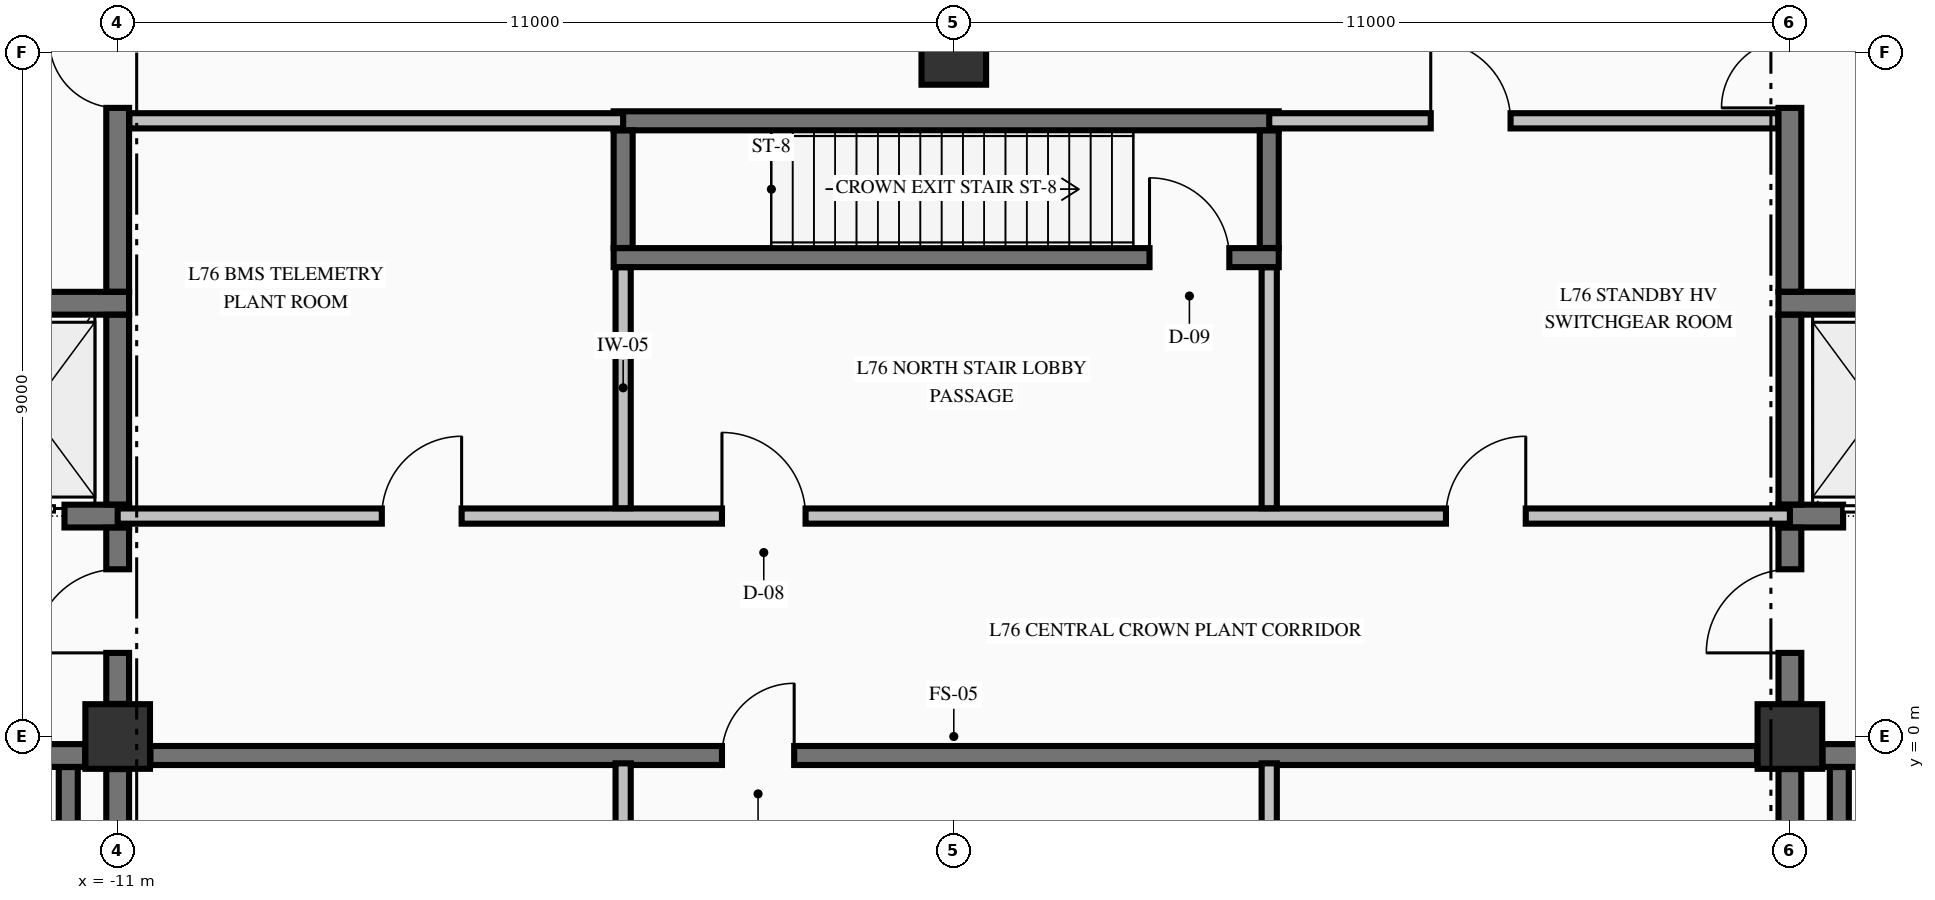
"""IFC4 building model, lengths in metres.
Left out: names, types, materials, properties, quantities, classifications, styles, units other than length and angle.
Written with IfcOpenShell. Run it as: python <this file> out.ifc"""

import sys

from ifc_helpers import new_model, si_unit, direction, frame, frame_2d, origin, origin_2d, place, context, subcontext, project, spatial, rectangle, extrude, element, fill, save


model = new_model("IFC4")
c1 = context("Model", 3, precision=1e-05, world=origin(), true_north=direction((0.0, 1.0)))
c2 = subcontext(c1, "Body", "Model", "MODEL_VIEW")
j1 = project(units=[si_unit("LENGTHUNIT", "METRE"), si_unit("PLANEANGLEUNIT", "RADIAN")], contexts=[c1])
p1 = place(None, origin())
s1 = spatial("IfcSite", under=j1, at=p1, CompositionType="ELEMENT")
p2 = place(p1, origin())
s2 = spatial("IfcBuilding", under=s1, at=p2, CompositionType="ELEMENT")
p3 = place(p2, frame((0.0, 0.0, 284.86)))
s3 = spatial("IfcBuildingStorey", under=s2, at=p3, CompositionType="ELEMENT", Elevation=284.86)
for number, where, z_axis, x_axis in (
    (1, (-11.0, 0.0, -0.325), (0.0, 0.0, 1.0), (1.0, 0.0, 0.0)),
    (2, (11.0, 0.0, -0.325), (0.0, 0.0, 1.0), (1.0, 0.0, 0.0)),
    (3, (0.0, 9.0, -0.325), (0.0, 0.0, 1.0), (1.0, 0.0, 0.0)),
):
    element("IfcColumn", number, at=place(p3, frame(where, z_axis=z_axis, x_axis=x_axis)), inside=s3, PredefinedType="COLUMN", context=c2, shape_type="SweptSolid", body=[
        extrude(rectangle(XDim=0.85, YDim=0.85, at=origin_2d()), origin(), (0.0, 0.0, 1.0), 3.06),
    ])
p4 = place(p3, frame((-14.85, -0.25, 0.0), z_axis=(0.0, 0.0, 1.0), x_axis=(1.0, 0.0, 0.0)))
e4 = element("IfcWall", 4, at=p4, inside=s3, PredefinedType="SHEAR", context=c2, shape_type="SweptSolid", body=[
    extrude(rectangle(XDim=3.421, YDim=0.3, at=frame_2d((1.71, 0.0))), origin(), (0.0, 0.0, 1.0), 2.735),
])
p5 = place(p4, frame((1.15, 0.0, 0.0)))
e5 = element("IfcOpeningElement", 5, at=p5, cuts=e4, PredefinedType="OPENING", context=c2, shape_type="SweptSolid", body=[
    extrude(rectangle(XDim=1.1, YDim=2.15, at=frame_2d((0.55, 1.075))), frame((0.0, 0.16, 0.0), z_axis=(0.0, -1.0, 0.0), x_axis=(1.0, 0.0, 0.0)), (0.0, 0.0, 1.0), 0.32),
])
p6 = place(p3, frame((11.429, -0.25, 0.0), z_axis=(0.0, 0.0, 1.0), x_axis=(1.0, 0.0, 0.0)))
e6 = element("IfcWall", 6, at=p6, inside=s3, PredefinedType="SHEAR", context=c2, shape_type="SweptSolid", body=[
    extrude(rectangle(XDim=3.421, YDim=0.3, at=frame_2d((1.71, 0.0))), origin(), (0.0, 0.0, 1.0), 2.735),
])
p7 = place(p6, frame((1.171, 0.0, 0.0)))
e7 = element("IfcOpeningElement", 7, at=p7, cuts=e6, PredefinedType="OPENING", context=c2, shape_type="SweptSolid", body=[
    extrude(rectangle(XDim=1.1, YDim=2.15, at=frame_2d((0.55, 1.075))), frame((0.0, 0.16, 0.0), z_axis=(0.0, -1.0, 0.0), x_axis=(1.0, 0.0, 0.0)), (0.0, 0.0, 1.0), 0.32),
])
p8 = place(p3, frame((-14.85, 2.9, 0.0), z_axis=(0.0, 0.0, 1.0), x_axis=(1.0, 0.0, 0.0)))
e8 = element("IfcWall", 8, at=p8, inside=s3, PredefinedType="SHEAR", context=c2, shape_type="SweptSolid", body=[
    extrude(rectangle(XDim=4.0, YDim=0.3, at=frame_2d((2.0, 0.0))), origin(), (0.0, 0.0, 1.0), 2.735),
])
p9 = place(p8, frame((2.05, 0.0, 0.0)))
e9 = element("IfcOpeningElement", 9, at=p9, cuts=e8, PredefinedType="OPENING", context=c2, shape_type="SweptSolid", body=[
    extrude(rectangle(XDim=1.1, YDim=2.2, at=frame_2d((0.55, 1.1))), frame((0.0, 0.16, 0.0), z_axis=(0.0, -1.0, 0.0), x_axis=(1.0, 0.0, 0.0)), (0.0, 0.0, 1.0), 0.32),
])
p10 = place(p3, frame((10.85, 2.9, 0.0), z_axis=(0.0, 0.0, 1.0), x_axis=(1.0, 0.0, 0.0)))
e10 = element("IfcWall", 10, at=p10, inside=s3, PredefinedType="SHEAR", context=c2, shape_type="SweptSolid", body=[
    extrude(rectangle(XDim=4.0, YDim=0.3, at=frame_2d((2.0, 0.0))), origin(), (0.0, 0.0, 1.0), 2.735),
])
p11 = place(p10, frame((0.85, 0.0, 0.0)))
e11 = element("IfcOpeningElement", 11, at=p11, cuts=e10, PredefinedType="OPENING", context=c2, shape_type="SweptSolid", body=[
    extrude(rectangle(XDim=1.1, YDim=2.2, at=frame_2d((0.55, 1.1))), frame((0.0, 0.16, 0.0), z_axis=(0.0, -1.0, 0.0), x_axis=(1.0, 0.0, 0.0)), (0.0, 0.0, 1.0), 0.32),
])
for number, where, z_axis, x_axis in (
    (12, (-14.85, 5.7, 0.0), (0.0, 0.0, 1.0), (1.0, 0.0, 0.0)),
    (13, (10.85, 5.7, 0.0), (0.0, 0.0, 1.0), (1.0, 0.0, 0.0)),
):
    element("IfcWall", number, at=place(p3, frame(where, z_axis=z_axis, x_axis=x_axis)), inside=s3, PredefinedType="SHEAR", context=c2, shape_type="SweptSolid", body=[
        extrude(rectangle(XDim=4.0, YDim=0.3, at=frame_2d((2.0, 0.0))), origin(), (0.0, 0.0, 1.0), 2.735),
    ])
p12 = place(p3, frame((-4.475, 6.3, 0.0), z_axis=(0.0, 0.0, 1.0), x_axis=(1.0, 0.0, 0.0)))
e14 = element("IfcWall", 14, at=p12, inside=s3, PredefinedType="SOLIDWALL", context=c2, shape_type="SweptSolid", body=[
    extrude(rectangle(XDim=8.75, YDim=0.25, at=frame_2d((4.375, 0.0))), origin(), (0.0, 0.0, 1.0), 2.735),
])
p13 = place(p12, frame((7.05, 0.0, 0.0)))
e15 = element("IfcOpeningElement", 15, at=p13, cuts=e14, PredefinedType="OPENING", context=c2, shape_type="SweptSolid", body=[
    extrude(rectangle(XDim=1.05, YDim=2.15, at=frame_2d((0.525, 1.075))), frame((0.0, 0.135, 0.0), z_axis=(0.0, -1.0, 0.0), x_axis=(1.0, 0.0, 0.0)), (0.0, 0.0, 1.0), 0.27),
])
p14 = place(p3, frame((-4.475, 8.1, 0.0), z_axis=(0.0, 0.0, 1.0), x_axis=(1.0, 0.0, 0.0)))
e16 = element("IfcWall", 16, at=p14, inside=s3, PredefinedType="SOLIDWALL", context=c2, shape_type="SweptSolid", body=[
    extrude(rectangle(XDim=8.75, YDim=0.25, at=frame_2d((4.375, 0.0))), origin(), (0.0, 0.0, 1.0), 2.735),
])
p15 = place(p3, frame((-10.569, -0.25, 0.0), z_axis=(0.0, 0.0, 1.0), x_axis=(1.0, 0.0, 0.0)))
e17 = element("IfcWall", 17, at=p15, inside=s3, PredefinedType="SOLIDWALL", context=c2, shape_type="SweptSolid", body=[
    extrude(rectangle(XDim=21.138, YDim=0.25, at=frame_2d((10.569, 0.0))), origin(), (0.0, 0.0, 1.0), 2.735),
])
p16 = place(p15, frame((7.519, 0.0, 0.0)))
e18 = element("IfcOpeningElement", 18, at=p16, cuts=e17, PredefinedType="OPENING", context=c2, shape_type="SweptSolid", body=[
    extrude(rectangle(XDim=0.95, YDim=2.02, at=frame_2d((0.475, 1.01))), frame((0.0, 0.135, 0.0), z_axis=(0.0, -1.0, 0.0), x_axis=(1.0, 0.0, 0.0)), (0.0, 0.0, 1.0), 0.27),
])
p17 = place(p3, frame((-11.0, 2.9, 0.0), z_axis=(0.0, 0.0, 1.0), x_axis=(1.0, 0.0, 0.0)))
e19 = element("IfcWall", 19, at=p17, inside=s3, PredefinedType="PARTITIONING", context=c2, shape_type="SweptSolid", body=[
    extrude(rectangle(XDim=22.0, YDim=0.2, at=frame_2d((11.0, 0.0))), origin(), (0.0, 0.0, 1.0), 2.735),
])
p18 = place(p17, frame((7.95, 0.0, 0.0)))
e20 = element("IfcOpeningElement", 20, at=p18, cuts=e19, PredefinedType="OPENING", context=c2, shape_type="SweptSolid", body=[
    extrude(rectangle(XDim=1.1, YDim=2.15, at=frame_2d((0.55, 1.075))), frame((0.0, 0.11, 0.0), z_axis=(0.0, -1.0, 0.0), x_axis=(1.0, 0.0, 0.0)), (0.0, 0.0, 1.0), 0.22),
])
p19 = place(p17, frame((17.475, 0.0, 0.0)))
e21 = element("IfcOpeningElement", 21, at=p19, cuts=e19, PredefinedType="OPENING", context=c2, shape_type="SweptSolid", body=[
    extrude(rectangle(XDim=1.05, YDim=2.15, at=frame_2d((0.525, 1.075))), frame((0.0, 0.11, 0.0), z_axis=(0.0, -1.0, 0.0), x_axis=(1.0, 0.0, 0.0)), (0.0, 0.0, 1.0), 0.22),
])
p20 = place(p17, frame((3.475, 0.0, 0.0)))
e22 = element("IfcOpeningElement", 22, at=p20, cuts=e19, PredefinedType="OPENING", context=c2, shape_type="SweptSolid", body=[
    extrude(rectangle(XDim=1.05, YDim=2.15, at=frame_2d((0.525, 1.075))), frame((0.0, 0.11, 0.0), z_axis=(0.0, -1.0, 0.0), x_axis=(1.0, 0.0, 0.0)), (0.0, 0.0, 1.0), 0.22),
])
p21 = place(p3, frame((-10.847, 8.1, 0.0), z_axis=(0.0, 0.0, 1.0), x_axis=(1.0, 0.0, 0.0)))
e23 = element("IfcWall", 23, at=p21, inside=s3, PredefinedType="PARTITIONING", context=c2, shape_type="SweptSolid", body=[
    extrude(rectangle(XDim=6.497, YDim=0.2, at=frame_2d((3.249, 0.0))), origin(), (0.0, 0.0, 1.0), 2.735),
])
p22 = place(p3, frame((4.15, 8.1, 0.0), z_axis=(0.0, 0.0, 1.0), x_axis=(1.0, 0.0, 0.0)))
e24 = element("IfcWall", 24, at=p22, inside=s3, PredefinedType="PARTITIONING", context=c2, shape_type="SweptSolid", body=[
    extrude(rectangle(XDim=6.697, YDim=0.2, at=frame_2d((3.349, 0.0))), origin(), (0.0, 0.0, 1.0), 2.735),
])
p23 = place(p22, frame((2.125, 0.0, 0.0)))
e25 = element("IfcOpeningElement", 25, at=p23, cuts=e24, PredefinedType="OPENING", context=c2, shape_type="SweptSolid", body=[
    extrude(rectangle(XDim=1.05, YDim=2.15, at=frame_2d((0.525, 1.075))), frame((0.0, 0.11, 0.0), z_axis=(0.0, -1.0, 0.0), x_axis=(1.0, 0.0, 0.0)), (0.0, 0.0, 1.0), 0.22),
])
p24 = place(p3, frame((-11.65, -9.798, 0.0), z_axis=(0.0, 0.0, 1.0), x_axis=(0.0, 1.0, 0.0)))
e26 = element("IfcWall", 26, at=p24, inside=s3, PredefinedType="SOLIDWALL", context=c2, shape_type="SweptSolid", body=[
    extrude(rectangle(XDim=9.396, YDim=0.25, at=frame_2d((4.698, 0.0))), origin(), (0.0, 0.0, 1.0), 2.735),
])
p25 = place(p3, frame((-11.0, -9.798, 0.0), z_axis=(0.0, 0.0, 1.0), x_axis=(0.0, 1.0, 0.0)))
e27 = element("IfcWall", 27, at=p25, inside=s3, PredefinedType="SHEAR", context=c2, shape_type="SweptSolid", body=[
    extrude(rectangle(XDim=9.369, YDim=0.3, at=frame_2d((4.685, 0.0))), origin(), (0.0, 0.0, 1.0), 2.735),
])
p26 = place(p3, frame((-11.0, 0.429, 0.0), z_axis=(0.0, 0.0, 1.0), x_axis=(0.0, 1.0, 0.0)))
e28 = element("IfcWall", 28, at=p26, inside=s3, PredefinedType="SHEAR", context=c2, shape_type="SweptSolid", body=[
    extrude(rectangle(XDim=2.319, YDim=0.3, at=frame_2d((1.16, 0.0))), origin(), (0.0, 0.0, 1.0), 2.735),
])
p27 = place(p26, frame((0.671, 0.0, 0.0)))
e29 = element("IfcOpeningElement", 29, at=p27, cuts=e28, PredefinedType="OPENING", context=c2, shape_type="SweptSolid", body=[
    extrude(rectangle(XDim=1.1, YDim=2.15, at=frame_2d((0.55, 1.075))), frame((0.0, 0.16, 0.0), z_axis=(0.0, -1.0, 0.0), x_axis=(1.0, 0.0, 0.0)), (0.0, 0.0, 1.0), 0.32),
])
p28 = place(p3, frame((-11.0, 3.052, 0.0), z_axis=(0.0, 0.0, 1.0), x_axis=(0.0, 1.0, 0.0)))
e30 = element("IfcWall", 30, at=p28, inside=s3, PredefinedType="SHEAR", context=c2, shape_type="SweptSolid", body=[
    extrude(rectangle(XDim=2.496, YDim=0.3, at=frame_2d((1.248, 0.0))), origin(), (0.0, 0.0, 1.0), 2.735),
])
p29 = place(p3, frame((-11.0, 5.852, 0.0), z_axis=(0.0, 0.0, 1.0), x_axis=(0.0, 1.0, 0.0)))
e31 = element("IfcWall", 31, at=p29, inside=s3, PredefinedType="SHEAR", context=c2, shape_type="SweptSolid", body=[
    extrude(rectangle(XDim=4.719, YDim=0.3, at=frame_2d((2.359, 0.0))), origin(), (0.0, 0.0, 1.0), 2.735),
])
p30 = place(p29, frame((2.418, 0.0, 0.0)))
e32 = element("IfcOpeningElement", 32, at=p30, cuts=e31, PredefinedType="OPENING", context=c2, shape_type="SweptSolid", body=[
    extrude(rectangle(XDim=0.9, YDim=2.15, at=frame_2d((0.45, 1.075))), frame((0.0, 0.16, 0.0), z_axis=(0.0, -1.0, 0.0), x_axis=(1.0, 0.0, 0.0)), (0.0, 0.0, 1.0), 0.32),
])
for number, where, z_axis, x_axis in (
    (33, (-4.35, 6.427, 0.0), (0.0, 0.0, 1.0), (0.0, 1.0, 0.0)),
    (34, (4.15, 6.427, 0.0), (0.0, 0.0, 1.0), (0.0, 1.0, 0.0)),
):
    element("IfcWall", number, at=place(p3, frame(where, z_axis=z_axis, x_axis=x_axis)), inside=s3, PredefinedType="SOLIDWALL", context=c2, shape_type="SweptSolid", body=[
        extrude(rectangle(XDim=1.546, YDim=0.25, at=frame_2d((0.773, 0.0))), origin(), (0.0, 0.0, 1.0), 2.735),
    ])
p31 = place(p3, frame((11.0, -9.798, 0.0), z_axis=(0.0, 0.0, 1.0), x_axis=(0.0, 1.0, 0.0)))
e35 = element("IfcWall", 35, at=p31, inside=s3, PredefinedType="SHEAR", context=c2, shape_type="SweptSolid", body=[
    extrude(rectangle(XDim=9.369, YDim=0.3, at=frame_2d((4.685, 0.0))), origin(), (0.0, 0.0, 1.0), 2.735),
])
p32 = place(p3, frame((11.0, 0.429, 0.0), z_axis=(0.0, 0.0, 1.0), x_axis=(0.0, 1.0, 0.0)))
e36 = element("IfcWall", 36, at=p32, inside=s3, PredefinedType="SHEAR", context=c2, shape_type="SweptSolid", body=[
    extrude(rectangle(XDim=2.319, YDim=0.3, at=frame_2d((1.16, 0.0))), origin(), (0.0, 0.0, 1.0), 2.735),
])
p33 = place(p32, frame((0.671, 0.0, 0.0)))
e37 = element("IfcOpeningElement", 37, at=p33, cuts=e36, PredefinedType="OPENING", context=c2, shape_type="SweptSolid", body=[
    extrude(rectangle(XDim=1.1, YDim=2.15, at=frame_2d((0.55, 1.075))), frame((0.0, 0.16, 0.0), z_axis=(0.0, -1.0, 0.0), x_axis=(1.0, 0.0, 0.0)), (0.0, 0.0, 1.0), 0.32),
])
p34 = place(p3, frame((11.0, 3.052, 0.0), z_axis=(0.0, 0.0, 1.0), x_axis=(0.0, 1.0, 0.0)))
e38 = element("IfcWall", 38, at=p34, inside=s3, PredefinedType="SHEAR", context=c2, shape_type="SweptSolid", body=[
    extrude(rectangle(XDim=2.496, YDim=0.3, at=frame_2d((1.248, 0.0))), origin(), (0.0, 0.0, 1.0), 2.735),
])
p35 = place(p3, frame((11.0, 5.852, 0.0), z_axis=(0.0, 0.0, 1.0), x_axis=(0.0, 1.0, 0.0)))
e39 = element("IfcWall", 39, at=p35, inside=s3, PredefinedType="SHEAR", context=c2, shape_type="SweptSolid", body=[
    extrude(rectangle(XDim=4.719, YDim=0.3, at=frame_2d((2.359, 0.0))), origin(), (0.0, 0.0, 1.0), 2.735),
])
p36 = place(p35, frame((2.418, 0.0, 0.0)))
e40 = element("IfcOpeningElement", 40, at=p36, cuts=e39, PredefinedType="OPENING", context=c2, shape_type="SweptSolid", body=[
    extrude(rectangle(XDim=0.9, YDim=2.15, at=frame_2d((0.45, 1.075))), frame((0.0, 0.16, 0.0), z_axis=(0.0, -1.0, 0.0), x_axis=(1.0, 0.0, 0.0)), (0.0, 0.0, 1.0), 0.32),
])
p37 = place(p3, frame((11.65, -9.798, 0.0), z_axis=(0.0, 0.0, 1.0), x_axis=(0.0, 1.0, 0.0)))
e41 = element("IfcWall", 41, at=p37, inside=s3, PredefinedType="SOLIDWALL", context=c2, shape_type="SweptSolid", body=[
    extrude(rectangle(XDim=9.396, YDim=0.25, at=frame_2d((4.698, 0.0))), origin(), (0.0, 0.0, 1.0), 2.735),
])
p38 = place(p3, frame((-4.35, -6.172, 0.0), z_axis=(0.0, 0.0, 1.0), x_axis=(0.0, 1.0, 0.0)))
e42 = element("IfcWall", 42, at=p38, inside=s3, PredefinedType="PARTITIONING", context=c2, shape_type="SweptSolid", body=[
    extrude(rectangle(XDim=5.819, YDim=0.2, at=frame_2d((2.91, 0.0))), origin(), (0.0, 0.0, 1.0), 2.735),
])
p39 = place(p38, frame((2.447, 0.0, 0.0)))
e43 = element("IfcOpeningElement", 43, at=p39, cuts=e42, PredefinedType="OPENING", context=c2, shape_type="SweptSolid", body=[
    extrude(rectangle(XDim=1.05, YDim=2.15, at=frame_2d((0.525, 1.075))), frame((0.0, 0.11, 0.0), z_axis=(0.0, -1.0, 0.0), x_axis=(1.0, 0.0, 0.0)), (0.0, 0.0, 1.0), 0.22),
])
p40 = place(p3, frame((-4.35, 3.003, 0.0), z_axis=(0.0, 0.0, 1.0), x_axis=(0.0, 1.0, 0.0)))
e44 = element("IfcWall", 44, at=p40, inside=s3, PredefinedType="PARTITIONING", context=c2, shape_type="SweptSolid", body=[
    extrude(rectangle(XDim=3.169, YDim=0.2, at=frame_2d((1.584, 0.0))), origin(), (0.0, 0.0, 1.0), 2.735),
])
p41 = place(p3, frame((4.15, -6.172, 0.0), z_axis=(0.0, 0.0, 1.0), x_axis=(0.0, 1.0, 0.0)))
e45 = element("IfcWall", 45, at=p41, inside=s3, PredefinedType="PARTITIONING", context=c2, shape_type="SweptSolid", body=[
    extrude(rectangle(XDim=5.819, YDim=0.2, at=frame_2d((2.91, 0.0))), origin(), (0.0, 0.0, 1.0), 2.735),
])
p42 = place(p41, frame((2.447, 0.0, 0.0)))
e46 = element("IfcOpeningElement", 46, at=p42, cuts=e45, PredefinedType="OPENING", context=c2, shape_type="SweptSolid", body=[
    extrude(rectangle(XDim=1.05, YDim=2.15, at=frame_2d((0.525, 1.075))), frame((0.0, 0.11, 0.0), z_axis=(0.0, -1.0, 0.0), x_axis=(1.0, 0.0, 0.0)), (0.0, 0.0, 1.0), 0.22),
])
p43 = place(p3, frame((4.15, 3.003, 0.0), z_axis=(0.0, 0.0, 1.0), x_axis=(0.0, 1.0, 0.0)))
e47 = element("IfcWall", 47, at=p43, inside=s3, PredefinedType="PARTITIONING", context=c2, shape_type="SweptSolid", body=[
    extrude(rectangle(XDim=3.169, YDim=0.2, at=frame_2d((1.584, 0.0))), origin(), (0.0, 0.0, 1.0), 2.735),
])
p44 = place(p27, origin())
e48 = element("IfcDoor", 48, at=p44, inside=s3, OperationType="SINGLE_SWING_LEFT", PredefinedType="DOOR", context=c2, shape_type="SweptSolid", body=[
    extrude(rectangle(XDim=1.1, YDim=2.15, at=frame_2d((0.55, 1.075))), frame((0.0, 0.025, 0.0), z_axis=(0.0, -1.0, 0.0), x_axis=(1.0, 0.0, 0.0)), (0.0, 0.0, 1.0), 0.05),
])
fill(e29, e48)
p45 = place(p9, origin())
e49 = element("IfcDoor", 49, at=p45, inside=s3, OperationType="SLIDING_TO_LEFT", PredefinedType="DOOR", context=c2, shape_type="SweptSolid", body=[
    extrude(rectangle(XDim=1.1, YDim=2.2, at=frame_2d((0.55, 1.1))), frame((0.0, 0.025, 0.0), z_axis=(0.0, -1.0, 0.0), x_axis=(1.0, 0.0, 0.0)), (0.0, 0.0, 1.0), 0.05),
])
fill(e9, e49)
p46 = place(p33, origin())
e50 = element("IfcDoor", 50, at=p46, inside=s3, OperationType="SINGLE_SWING_LEFT", PredefinedType="DOOR", context=c2, shape_type="SweptSolid", body=[
    extrude(rectangle(XDim=1.1, YDim=2.15, at=frame_2d((0.55, 1.075))), frame((0.0, 0.025, 0.0), z_axis=(0.0, -1.0, 0.0), x_axis=(1.0, 0.0, 0.0)), (0.0, 0.0, 1.0), 0.05),
])
fill(e37, e50)
p47 = place(p11, origin())
e51 = element("IfcDoor", 51, at=p47, inside=s3, OperationType="SLIDING_TO_RIGHT", PredefinedType="DOOR", context=c2, shape_type="SweptSolid", body=[
    extrude(rectangle(XDim=1.1, YDim=2.2, at=frame_2d((0.55, 1.1))), frame((0.0, 0.025, 0.0), z_axis=(0.0, -1.0, 0.0), x_axis=(1.0, 0.0, 0.0)), (0.0, 0.0, 1.0), 0.05),
])
fill(e11, e51)
p48 = place(p30, origin())
e52 = element("IfcDoor", 52, at=p48, inside=s3, OperationType="SINGLE_SWING_RIGHT", PredefinedType="DOOR", context=c2, shape_type="SweptSolid", body=[
    extrude(rectangle(XDim=0.9, YDim=2.15, at=frame_2d((0.45, 1.075))), frame((0.0, 0.025, 0.0), z_axis=(0.0, -1.0, 0.0), x_axis=(1.0, 0.0, 0.0)), (0.0, 0.0, 1.0), 0.05),
])
fill(e32, e52)
p49 = place(p36, origin())
e53 = element("IfcDoor", 53, at=p49, inside=s3, OperationType="SINGLE_SWING_LEFT", PredefinedType="DOOR", context=c2, shape_type="SweptSolid", body=[
    extrude(rectangle(XDim=0.9, YDim=2.15, at=frame_2d((0.45, 1.075))), frame((0.0, 0.025, 0.0), z_axis=(0.0, -1.0, 0.0), x_axis=(1.0, 0.0, 0.0)), (0.0, 0.0, 1.0), 0.05),
])
fill(e40, e53)
p50 = place(p13, origin())
e54 = element("IfcDoor", 54, at=p50, inside=s3, OperationType="SINGLE_SWING_LEFT", PredefinedType="DOOR", context=c2, shape_type="SweptSolid", body=[
    extrude(rectangle(XDim=1.05, YDim=2.15, at=frame_2d((0.525, 1.075))), frame((0.0, 0.025, 0.0), z_axis=(0.0, -1.0, 0.0), x_axis=(1.0, 0.0, 0.0)), (0.0, 0.0, 1.0), 0.05),
])
fill(e15, e54)
p51 = place(p16, origin())
e55 = element("IfcDoor", 55, at=p51, inside=s3, OperationType="SINGLE_SWING_RIGHT", PredefinedType="DOOR", context=c2, shape_type="SweptSolid", body=[
    extrude(rectangle(XDim=0.95, YDim=2.02, at=frame_2d((0.475, 1.01))), frame((0.0, 0.025, 0.0), z_axis=(0.0, -1.0, 0.0), x_axis=(1.0, 0.0, 0.0)), (0.0, 0.0, 1.0), 0.05),
])
fill(e18, e55)
p52 = place(p18, origin())
e56 = element("IfcDoor", 56, at=p52, inside=s3, OperationType="SINGLE_SWING_LEFT", PredefinedType="DOOR", context=c2, shape_type="SweptSolid", body=[
    extrude(rectangle(XDim=1.1, YDim=2.15, at=frame_2d((0.55, 1.075))), frame((0.0, 0.025, 0.0), z_axis=(0.0, -1.0, 0.0), x_axis=(1.0, 0.0, 0.0)), (0.0, 0.0, 1.0), 0.05),
])
fill(e20, e56)
p53 = place(p19, origin())
e57 = element("IfcDoor", 57, at=p53, inside=s3, OperationType="SINGLE_SWING_RIGHT", PredefinedType="DOOR", context=c2, shape_type="SweptSolid", body=[
    extrude(rectangle(XDim=1.05, YDim=2.15, at=frame_2d((0.525, 1.075))), frame((0.0, 0.025, 0.0), z_axis=(0.0, -1.0, 0.0), x_axis=(1.0, 0.0, 0.0)), (0.0, 0.0, 1.0), 0.05),
])
fill(e21, e57)
p54 = place(p23, origin())
e58 = element("IfcDoor", 58, at=p54, inside=s3, OperationType="SINGLE_SWING_LEFT", PredefinedType="DOOR", context=c2, shape_type="SweptSolid", body=[
    extrude(rectangle(XDim=1.05, YDim=2.15, at=frame_2d((0.525, 1.075))), frame((0.0, 0.025, 0.0), z_axis=(0.0, -1.0, 0.0), x_axis=(1.0, 0.0, 0.0)), (0.0, 0.0, 1.0), 0.05),
])
fill(e25, e58)
p55 = place(p20, origin())
e59 = element("IfcDoor", 59, at=p55, inside=s3, OperationType="SINGLE_SWING_RIGHT", PredefinedType="DOOR", context=c2, shape_type="SweptSolid", body=[
    extrude(rectangle(XDim=1.05, YDim=2.15, at=frame_2d((0.525, 1.075))), frame((0.0, 0.025, 0.0), z_axis=(0.0, -1.0, 0.0), x_axis=(1.0, 0.0, 0.0)), (0.0, 0.0, 1.0), 0.05),
])
fill(e22, e59)
save(model, sys.argv[1])
